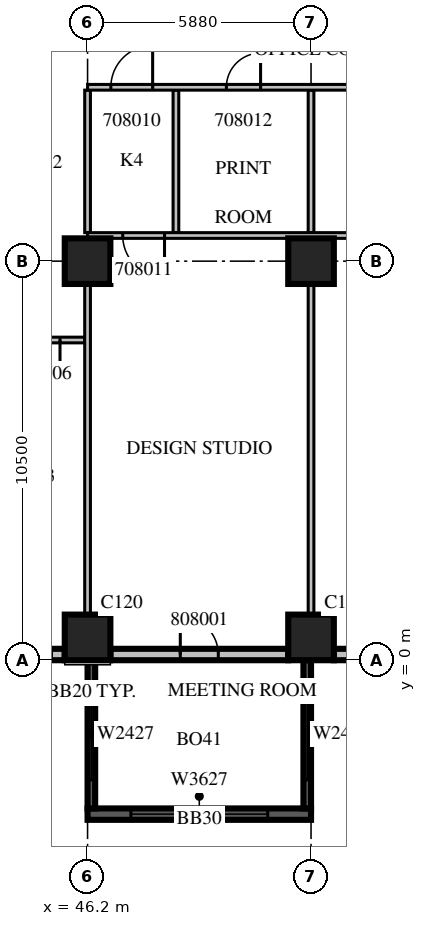
"""IFC4 building model, lengths in metres.
Left out: names, types, materials, properties, quantities, classifications, styles, units other than length and angle.
Written with IfcOpenShell. Run it as: python <this file> out.ifc"""

import sys

from ifc_helpers import new_model, si_unit, direction, frame, frame_2d, origin, origin_2d, place, context, subcontext, project, spatial, rectangle, extrude, source, transform, mapped, element, fill, save


model = new_model("IFC4")
c1 = context("Model", 3, precision=1e-05, world=origin(), true_north=direction((0.0, 1.0)))
c2 = subcontext(c1, "Body", "Model", "MODEL_VIEW")
j1 = project(units=[si_unit("LENGTHUNIT", "METRE"), si_unit("PLANEANGLEUNIT", "RADIAN")], contexts=[c1])
p1 = place(None, origin())
s1 = spatial("IfcSite", under=j1, at=p1, CompositionType="ELEMENT")
p2 = place(p1, origin())
s2 = spatial("IfcBuilding", under=s1, at=p2, CompositionType="ELEMENT")
p3 = place(p2, frame((0.0, 0.0, 44.7)))
s3 = spatial("IfcBuildingStorey", under=s2, at=p3, CompositionType="ELEMENT", Elevation=44.7)
m1 = source(origin(), c2, "Body", "SweptSolid", [
    extrude(rectangle(XDim=1.2, YDim=1.2, at=origin_2d()), origin(), (0.0, 0.0, 1.0), 4.2),
])
for number, where, z_axis, x_axis in (
    (1, (46.2, 0.6, 0.0), (0.0, 0.0, 1.0), (1.0, 0.0, 0.0)),
    (2, (52.08, 0.6, 0.0), (0.0, 0.0, 1.0), (1.0, 0.0, 0.0)),
    (3, (46.2, 10.5, 0.0), (0.0, 0.0, 1.0), (1.0, 0.0, 0.0)),
    (4, (52.08, 10.5, 0.0), (0.0, 0.0, 1.0), (1.0, 0.0, 0.0)),
):
    element("IfcColumn", number, at=place(p3, frame(where, z_axis=z_axis, x_axis=x_axis)), inside=s3, PredefinedType="COLUMN", context=c2, shape_type="MappedRepresentation", body=[
        mapped(m1, transform((0.0, 0.0, 0.0), scale=1.0)),
    ])
m2 = source(origin(), c2, "Body", "SweptSolid", [
    extrude(rectangle(XDim=1.6, YDim=0.3, at=frame_2d((0.8, 0.0))), origin(), (0.0, 0.0, 1.0), 3.8),
])
p4 = place(p3, frame((44.0, 0.15, 0.0), z_axis=(0.0, 0.0, 1.0), x_axis=(1.0, 0.0, 0.0)))
e5 = element("IfcWall", 5, at=p4, inside=s3, PredefinedType="STANDARD", context=c2, shape_type="MappedRepresentation", body=[
    mapped(m2, transform((0.0, 0.0, 0.0), scale=1.0)),
])
m3 = source(origin(), c2, "Body", "SweptSolid", [
    extrude(rectangle(XDim=0.9, YDim=2.7, at=frame_2d((0.45, 1.35))), frame((0.0, 0.16, 0.0), z_axis=(0.0, -1.0, 0.0), x_axis=(1.0, 0.0, 0.0)), (0.0, 0.0, 1.0), 0.32),
])
p5 = place(p4, frame((0.35, 0.0, 0.6)))
e6 = element("IfcOpeningElement", 6, at=p5, cuts=e5, PredefinedType="OPENING", context=c2, shape_type="MappedRepresentation", body=[
    mapped(m3, transform((0.0, 0.0, 0.0), scale=1.0)),
])
m4 = source(origin(), c2, "Body", "SweptSolid", [
    extrude(rectangle(XDim=4.68, YDim=0.3, at=frame_2d((2.34, 0.0))), origin(), (0.0, 0.0, 1.0), 3.8),
])
p6 = place(p3, frame((46.8, 0.15, 0.0), z_axis=(0.0, 0.0, 1.0), x_axis=(1.0, 0.0, 0.0)))
e7 = element("IfcWall", 7, at=p6, inside=s3, PredefinedType="STANDARD", context=c2, shape_type="MappedRepresentation", body=[
    mapped(m4, transform((0.0, 0.0, 0.0), scale=1.0)),
])
m5 = source(origin(), c2, "Body", "SweptSolid", [
    extrude(rectangle(XDim=1.0, YDim=2.1, at=frame_2d((0.5, 1.05))), frame((0.0, 0.16, 0.0), z_axis=(0.0, -1.0, 0.0), x_axis=(1.0, 0.0, 0.0)), (0.0, 0.0, 1.0), 0.32),
])
p7 = place(p6, frame((1.84, 0.0, 0.0)))
e8 = element("IfcOpeningElement", 8, at=p7, cuts=e7, PredefinedType="OPENING", context=c2, shape_type="MappedRepresentation", body=[
    mapped(m5, transform((0.0, 0.0, 0.0), scale=1.0)),
])
p8 = place(p3, frame((52.68, 0.15, 0.0), z_axis=(0.0, 0.0, 1.0), x_axis=(1.0, 0.0, 0.0)))
e9 = element("IfcWall", 9, at=p8, inside=s3, PredefinedType="STANDARD", context=c2, shape_type="MappedRepresentation", body=[
    mapped(m4, transform((0.0, 0.0, 0.0), scale=1.0)),
])
m6 = source(origin(), c2, "Body", "SweptSolid", [
    extrude(rectangle(XDim=3.6, YDim=2.7, at=frame_2d((1.8, 1.35))), frame((0.0, 0.16, 0.0), z_axis=(0.0, -1.0, 0.0), x_axis=(1.0, 0.0, 0.0)), (0.0, 0.0, 1.0), 0.32),
])
p9 = place(p8, frame((0.54, 0.0, 0.6)))
e10 = element("IfcOpeningElement", 10, at=p9, cuts=e9, PredefinedType="OPENING", context=c2, shape_type="MappedRepresentation", body=[
    mapped(m6, transform((0.0, 0.0, 0.0), scale=1.0)),
])
p10 = place(p3, frame((46.2, -4.05, 0.0), z_axis=(0.0, 0.0, 1.0), x_axis=(1.0, 0.0, 0.0)))
e11 = element("IfcWall", 11, at=p10, inside=s3, PredefinedType="SOLIDWALL", context=c2, shape_type="SweptSolid", body=[
    extrude(rectangle(XDim=5.88, YDim=0.3, at=frame_2d((2.94, 0.0))), origin(), (0.0, 0.0, 1.0), 3.79),
])
p11 = place(p10, frame((1.14, 0.0, 0.6)))
e12 = element("IfcOpeningElement", 12, at=p11, cuts=e11, PredefinedType="OPENING", context=c2, shape_type="MappedRepresentation", body=[
    mapped(m6, transform((0.0, 0.0, 0.0), scale=1.0)),
])
p12 = place(p3, frame((46.3, 0.0, 0.0), z_axis=(0.0, 0.0, 1.0), x_axis=(0.0, -1.0, 0.0)))
e13 = element("IfcWall", 13, at=p12, inside=s3, PredefinedType="SOLIDWALL", context=c2, shape_type="SweptSolid", body=[
    extrude(rectangle(XDim=3.9, YDim=0.2, at=frame_2d((1.95, 0.0))), origin(), (0.0, 0.0, 1.0), 3.79),
])
p13 = place(p12, frame((0.75, 0.0, 0.6)))
e14 = element("IfcOpeningElement", 14, at=p13, cuts=e13, PredefinedType="OPENING", context=c2, shape_type="SweptSolid", body=[
    extrude(rectangle(XDim=2.4, YDim=2.7, at=frame_2d((1.2, 1.35))), frame((0.0, 0.11, 0.0), z_axis=(0.0, -1.0, 0.0), x_axis=(1.0, 0.0, 0.0)), (0.0, 0.0, 1.0), 0.22),
])
m7 = source(origin(), c2, "Body", "SweptSolid", [
    extrude(rectangle(XDim=3.9, YDim=0.2, at=frame_2d((1.95, 0.0))), origin(), (0.0, 0.0, 1.0), 3.79),
])
p14 = place(p3, frame((51.98, 0.0, 0.0), z_axis=(0.0, 0.0, 1.0), x_axis=(0.0, -1.0, 0.0)))
e15 = element("IfcWall", 15, at=p14, inside=s3, PredefinedType="SOLIDWALL", context=c2, shape_type="MappedRepresentation", body=[
    mapped(m7, transform((0.0, 0.0, 0.0), scale=1.0)),
])
m8 = source(origin(), c2, "Body", "SweptSolid", [
    extrude(rectangle(XDim=2.4, YDim=2.7, at=frame_2d((1.2, 1.35))), frame((0.0, 0.11, 0.0), z_axis=(0.0, -1.0, 0.0), x_axis=(1.0, 0.0, 0.0)), (0.0, 0.0, 1.0), 0.22),
])
p15 = place(p14, frame((0.75, 0.0, 0.6)))
e16 = element("IfcOpeningElement", 16, at=p15, cuts=e15, PredefinedType="OPENING", context=c2, shape_type="MappedRepresentation", body=[
    mapped(m8, transform((0.0, 0.0, 0.0), scale=1.0)),
])
m9 = source(origin(), c2, "Body", "SweptSolid", [
    extrude(rectangle(XDim=2.2, YDim=0.15, at=frame_2d((1.1, 0.0))), origin(), (0.0, 0.0, 1.0), 3.8),
])
p16 = place(p3, frame((46.125, 8.425, 0.0), z_axis=(0.0, 0.0, 1.0), x_axis=(-1.0, 0.0, 0.0)))
e17 = element("IfcWall", 17, at=p16, inside=s3, PredefinedType="PARTITIONING", context=c2, shape_type="MappedRepresentation", body=[
    mapped(m9, transform((0.0, 0.0, 0.0), scale=1.0)),
])
m10 = source(origin(), c2, "Body", "SweptSolid", [
    extrude(rectangle(XDim=0.9, YDim=2.1, at=frame_2d((0.45, 1.05))), frame((0.0, 0.085, 0.0), z_axis=(0.0, -1.0, 0.0), x_axis=(1.0, 0.0, 0.0)), (0.0, 0.0, 1.0), 0.17),
])
p17 = place(p16, frame((0.65, 0.0, 0.0)))
e18 = element("IfcOpeningElement", 18, at=p17, cuts=e17, PredefinedType="OPENING", context=c2, shape_type="MappedRepresentation", body=[
    mapped(m10, transform((0.0, 0.0, 0.0), scale=1.0)),
])
m11 = source(origin(), c2, "Body", "SweptSolid", [
    extrude(rectangle(XDim=3.75, YDim=0.15, at=frame_2d((1.875, 0.0))), origin(), (0.0, 0.0, 1.0), 3.8),
])
p18 = place(p3, frame((48.525, 11.25, 0.0), z_axis=(0.0, 0.0, 1.0), x_axis=(0.0, 1.0, 0.0)))
e19 = element("IfcWall", 19, at=p18, inside=s3, PredefinedType="PARTITIONING", context=c2, shape_type="MappedRepresentation", body=[
    mapped(m11, transform((0.0, 0.0, 0.0), scale=1.0)),
])
m12 = source(origin(), c2, "Body", "SweptSolid", [
    extrude(rectangle(XDim=8.702, YDim=0.15, at=frame_2d((4.351, 0.0))), origin(), (0.0, 0.0, 1.0), 3.8),
])
p19 = place(p3, frame((46.2, 1.199, 0.0), z_axis=(0.0, 0.0, 1.0), x_axis=(0.0, 1.0, 0.0)))
e20 = element("IfcWall", 20, at=p19, inside=s3, PredefinedType="PARTITIONING", context=c2, shape_type="MappedRepresentation", body=[
    mapped(m12, transform((0.0, 0.0, 0.0), scale=1.0)),
])
p20 = place(p3, frame((46.2, 11.25, 0.0), z_axis=(0.0, 0.0, 1.0), x_axis=(0.0, 1.0, 0.0)))
e21 = element("IfcWall", 21, at=p20, inside=s3, PredefinedType="PARTITIONING", context=c2, shape_type="MappedRepresentation", body=[
    mapped(m11, transform((0.0, 0.0, 0.0), scale=1.0)),
])
p21 = place(p3, frame((52.08, 1.199, 0.0), z_axis=(0.0, 0.0, 1.0), x_axis=(0.0, 1.0, 0.0)))
e22 = element("IfcWall", 22, at=p21, inside=s3, PredefinedType="PARTITIONING", context=c2, shape_type="MappedRepresentation", body=[
    mapped(m12, transform((0.0, 0.0, 0.0), scale=1.0)),
])
p22 = place(p3, frame((52.08, 11.25, 0.0), z_axis=(0.0, 0.0, 1.0), x_axis=(0.0, 1.0, 0.0)))
e23 = element("IfcWall", 23, at=p22, inside=s3, PredefinedType="PARTITIONING", context=c2, shape_type="MappedRepresentation", body=[
    mapped(m11, transform((0.0, 0.0, 0.0), scale=1.0)),
])
p23 = place(p3, frame((71.1, 11.175, 0.0), z_axis=(0.0, 0.0, 1.0), x_axis=(-1.0, 0.0, 0.0)))
e24 = element("IfcWall", 24, at=p23, inside=s3, PredefinedType="PARTITIONING", context=c2, shape_type="SweptSolid", body=[
    extrude(rectangle(XDim=24.9, YDim=0.15, at=frame_2d((12.45, 0.0))), origin(), (0.0, 0.0, 1.0), 3.3),
])
m13 = source(origin(), c2, "Body", "SweptSolid", [
    extrude(rectangle(XDim=1.1, YDim=2.1, at=frame_2d((0.55, 1.05))), frame((0.0, 0.085, 0.0), z_axis=(0.0, -1.0, 0.0), x_axis=(1.0, 0.0, 0.0)), (0.0, 0.0, 1.0), 0.17),
])
p24 = place(p23, frame((22.875, 0.0, 0.0)))
e25 = element("IfcOpeningElement", 25, at=p24, cuts=e24, PredefinedType="OPENING", context=c2, shape_type="MappedRepresentation", body=[
    mapped(m13, transform((0.0, 0.0, 0.0), scale=1.0)),
])
p25 = place(p23, frame((15.633, 0.0, 0.0)))
e26 = element("IfcOpeningElement", 26, at=p25, cuts=e24, PredefinedType="OPENING", context=c2, shape_type="MappedRepresentation", body=[
    mapped(m10, transform((0.0, 0.0, 0.0), scale=1.0)),
])
p26 = place(p23, frame((9.752, 0.0, 0.0)))
e27 = element("IfcOpeningElement", 27, at=p26, cuts=e24, PredefinedType="OPENING", context=c2, shape_type="MappedRepresentation", body=[
    mapped(m10, transform((0.0, 0.0, 0.0), scale=1.0)),
])
p27 = place(p23, frame((4.607, 0.0, 0.0)))
e28 = element("IfcOpeningElement", 28, at=p27, cuts=e24, PredefinedType="OPENING", context=c2, shape_type="MappedRepresentation", body=[
    mapped(m10, transform((0.0, 0.0, 0.0), scale=1.0)),
])
p28 = place(p23, frame((2.243, 0.0, 0.0)))
e29 = element("IfcOpeningElement", 29, at=p28, cuts=e24, PredefinedType="OPENING", context=c2, shape_type="MappedRepresentation", body=[
    mapped(m10, transform((0.0, 0.0, 0.0), scale=1.0)),
])
m14 = source(origin(), c2, "Body", "SweptSolid", [
    extrude(rectangle(XDim=24.9, YDim=0.15, at=frame_2d((12.45, 0.0))), origin(), (0.0, 0.0, 1.0), 3.3),
])
p29 = place(p3, frame((71.1, 15.075, 0.0), z_axis=(0.0, 0.0, 1.0), x_axis=(-1.0, 0.0, 0.0)))
e30 = element("IfcWall", 30, at=p29, inside=s3, PredefinedType="PARTITIONING", context=c2, shape_type="MappedRepresentation", body=[
    mapped(m14, transform((0.0, 0.0, 0.0), scale=1.0)),
])
p30 = place(p29, frame((23.188, 0.0, 0.0)))
e31 = element("IfcOpeningElement", 31, at=p30, cuts=e30, PredefinedType="OPENING", context=c2, shape_type="MappedRepresentation", body=[
    mapped(m13, transform((0.0, 0.0, 0.0), scale=1.0)),
])
p31 = place(p29, frame((20.348, 0.0, 0.0)))
e32 = element("IfcOpeningElement", 32, at=p31, cuts=e30, PredefinedType="OPENING", context=c2, shape_type="MappedRepresentation", body=[
    mapped(m10, transform((0.0, 0.0, 0.0), scale=1.0)),
])
m15 = source(origin(), c2, "Body", "SweptSolid", [
    extrude(rectangle(XDim=1.2, YDim=2.1, at=frame_2d((0.6, 1.05))), frame((0.0, 0.085, 0.0), z_axis=(0.0, -1.0, 0.0), x_axis=(1.0, 0.0, 0.0)), (0.0, 0.0, 1.0), 0.17),
])
p32 = place(p29, frame((12.54, 0.0, 0.0)))
e33 = element("IfcOpeningElement", 33, at=p32, cuts=e30, PredefinedType="OPENING", context=c2, shape_type="MappedRepresentation", body=[
    mapped(m15, transform((0.0, 0.0, 0.0), scale=1.0)),
])
p33 = place(p29, frame((2.993, 0.0, 0.0)))
e34 = element("IfcOpeningElement", 34, at=p33, cuts=e30, PredefinedType="OPENING", context=c2, shape_type="MappedRepresentation", body=[
    mapped(m15, transform((0.0, 0.0, 0.0), scale=1.0)),
])
m16 = source(origin(), c2, "Body", "SweptSolid", [
    extrude(rectangle(XDim=3.6, YDim=2.7, at=frame_2d((1.8, 1.35))), frame((0.0, 0.03, 0.0), z_axis=(0.0, -1.0, 0.0), x_axis=(1.0, 0.0, 0.0)), (0.0, 0.0, 1.0), 0.06),
])
p34 = place(p11, origin())
e35 = element("IfcWindow", 35, at=p34, inside=s3, PartitioningType="SINGLE_PANEL", PredefinedType="WINDOW", context=c2, shape_type="MappedRepresentation", body=[
    mapped(m16, transform((0.0, 0.0, 0.0), scale=1.0)),
])
fill(e12, e35)
m17 = source(origin(), c2, "Body", "SweptSolid", [
    extrude(rectangle(XDim=2.4, YDim=2.7, at=frame_2d((1.2, 1.35))), frame((0.0, 0.03, 0.0), z_axis=(0.0, -1.0, 0.0), x_axis=(1.0, 0.0, 0.0)), (0.0, 0.0, 1.0), 0.06),
])
p35 = place(p13, origin())
e36 = element("IfcWindow", 36, at=p35, inside=s3, PartitioningType="SINGLE_PANEL", PredefinedType="WINDOW", context=c2, shape_type="MappedRepresentation", body=[
    mapped(m17, transform((0.0, 0.0, 0.0), scale=1.0)),
])
fill(e14, e36)
p36 = place(p15, origin())
e37 = element("IfcWindow", 37, at=p36, inside=s3, PartitioningType="SINGLE_PANEL", PredefinedType="WINDOW", context=c2, shape_type="MappedRepresentation", body=[
    mapped(m17, transform((0.0, 0.0, 0.0), scale=1.0)),
])
fill(e16, e37)
m18 = source(origin(), c2, "Body", "SweptSolid", [
    extrude(rectangle(XDim=0.9, YDim=2.1, at=frame_2d((0.45, 1.05))), frame((0.0, 0.025, 0.0), z_axis=(0.0, -1.0, 0.0), x_axis=(1.0, 0.0, 0.0)), (0.0, 0.0, 1.0), 0.05),
])
p37 = place(p17, origin())
e38 = element("IfcDoor", 38, at=p37, inside=s3, OperationType="SINGLE_SWING_LEFT", PredefinedType="DOOR", context=c2, shape_type="MappedRepresentation", body=[
    mapped(m18, transform((0.0, 0.0, 0.0), scale=1.0)),
])
fill(e18, e38)
m19 = source(origin(), c2, "Body", "SweptSolid", [
    extrude(rectangle(XDim=1.1, YDim=2.1, at=frame_2d((0.55, 1.05))), frame((0.0, 0.025, 0.0), z_axis=(0.0, -1.0, 0.0), x_axis=(1.0, 0.0, 0.0)), (0.0, 0.0, 1.0), 0.05),
])
p38 = place(p30, origin())
e39 = element("IfcDoor", 39, at=p38, inside=s3, OperationType="SINGLE_SWING_RIGHT", PredefinedType="DOOR", context=c2, shape_type="MappedRepresentation", body=[
    mapped(m19, transform((0.0, 0.0, 0.0), scale=1.0)),
])
fill(e31, e39)
p39 = place(p24, origin())
e40 = element("IfcDoor", 40, at=p39, inside=s3, OperationType="SINGLE_SWING_LEFT", PredefinedType="DOOR", context=c2, shape_type="MappedRepresentation", body=[
    mapped(m19, transform((0.0, 0.0, 0.0), scale=1.0)),
])
fill(e25, e40)
p40 = place(p31, origin())
e41 = element("IfcDoor", 41, at=p40, inside=s3, OperationType="SINGLE_SWING_RIGHT", PredefinedType="DOOR", context=c2, shape_type="MappedRepresentation", body=[
    mapped(m18, transform((0.0, 0.0, 0.0), scale=1.0)),
])
fill(e32, e41)
m20 = source(origin(), c2, "Body", "SweptSolid", [
    extrude(rectangle(XDim=1.0, YDim=2.1, at=frame_2d((0.5, 1.05))), frame((0.0, 0.025, 0.0), z_axis=(0.0, -1.0, 0.0), x_axis=(1.0, 0.0, 0.0)), (0.0, 0.0, 1.0), 0.05),
])
p41 = place(p7, origin())
e42 = element("IfcDoor", 42, at=p41, inside=s3, OperationType="SINGLE_SWING_LEFT", PredefinedType="DOOR", context=c2, shape_type="MappedRepresentation", body=[
    mapped(m20, transform((0.0, 0.0, 0.0), scale=1.0)),
])
fill(e8, e42)
save(model, sys.argv[1])
